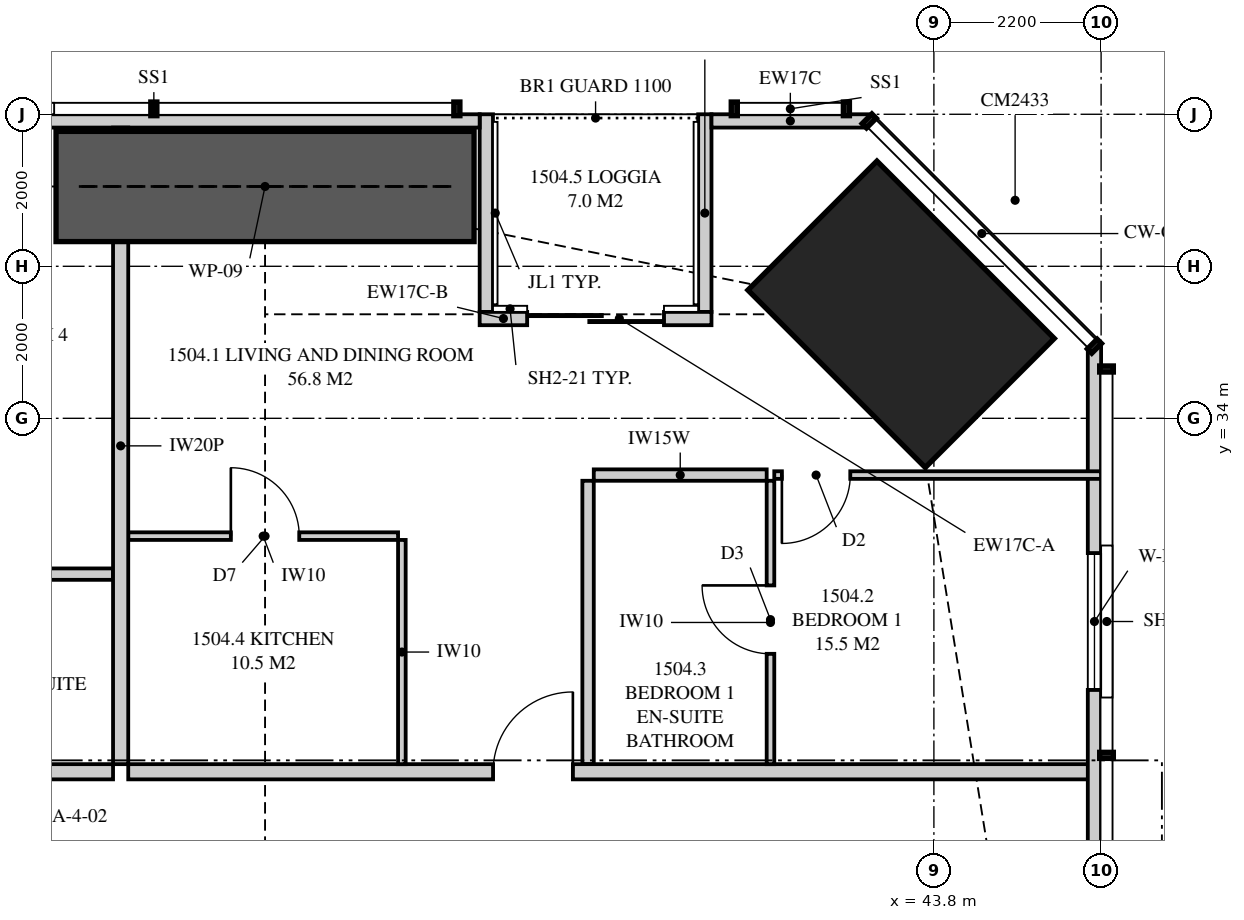
"""IFC4 building model, lengths in metres.
Left out: names, types, materials, properties, quantities, classifications, styles, units other than length and angle.
Written with IfcOpenShell. Run it as: python <this file> out.ifc"""

import sys

from ifc_helpers import new_model, si_unit, direction, frame, frame_2d, origin, origin_2d, place, context, subcontext, project, spatial, polyline, rectangle, outline, extrude, element, fill, save


model = new_model("IFC4")
c1 = context("Model", 3, precision=1e-05, world=origin(), true_north=direction((0.0, 1.0)))
c2 = subcontext(c1, "Body", "Model", "MODEL_VIEW")
j1 = project(units=[si_unit("LENGTHUNIT", "METRE"), si_unit("PLANEANGLEUNIT", "RADIAN")], contexts=[c1])
p1 = place(None, origin())
s1 = spatial("IfcSite", under=j1, at=p1, CompositionType="ELEMENT")
p2 = place(p1, origin())
s2 = spatial("IfcBuilding", under=s1, at=p2, CompositionType="ELEMENT")
p3 = place(p2, frame((0.0, 0.0, 57.85)))
s3 = spatial("IfcBuildingStorey", under=s2, at=p3, CompositionType="ELEMENT", Elevation=57.85)
p4 = place(p3, frame((43.369, 35.369, 0.0), z_axis=(0.0, 0.0, 1.0), x_axis=(-0.707106781187, -0.707106781187, 0.0)))
e1 = element("IfcColumn", 1, at=p4, inside=s3, PredefinedType="COLUMN", context=c2, shape_type="SweptSolid", body=[
    extrude(rectangle(XDim=2.4, YDim=3.3, at=origin_2d()), origin(), (0.0, 0.0, 1.0), 3.35),
])
p5 = place(p3, frame((45.913, 3.051, 0.0), z_axis=(0.0, 0.0, 1.0), x_axis=(0.0, 1.0, 0.0)))
e2 = element("IfcWall", 2, at=p5, inside=s3, PredefinedType="SOLIDWALL", context=c2, shape_type="SweptSolid", body=[
    extrude(outline(polyline([(0.0, 0.0), (31.897, 0.0), (31.897, 3.11), (22.167, 3.11), (22.167, 2.15), (22.074, 2.15), (22.074, 3.11), (21.949, 3.11), (21.949, 2.15), (9.949, 2.15), (9.949, 3.11), (9.823, 3.11), (9.823, 2.15), (9.73, 2.15), (9.73, 3.11), (0.0, 3.11), (0.0, 0.0)])), frame((0.0, 0.087, 0.0), z_axis=(0.0, -1.0, 0.0), x_axis=(1.0, 0.0, 0.0)), (0.0, 0.0, 1.0), 0.175),
])
p6 = place(p5, frame((2.222, 0.0, 0.4)))
e3 = element("IfcOpeningElement", 3, at=p6, cuts=e2, PredefinedType="OPENING", context=c2, shape_type="SweptSolid", body=[
    extrude(rectangle(XDim=1.8, YDim=1.7, at=frame_2d((0.9, 0.85))), frame((0.0, 0.097, 0.0), z_axis=(0.0, -1.0, 0.0), x_axis=(1.0, 0.0, 0.0)), (0.0, 0.0, 1.0), 0.195),
])
p7 = place(p5, frame((14.849, 0.0, 0.4)))
e4 = element("IfcOpeningElement", 4, at=p7, cuts=e2, PredefinedType="OPENING", context=c2, shape_type="SweptSolid", body=[
    extrude(rectangle(XDim=1.2, YDim=1.7, at=frame_2d((0.6, 0.85))), frame((0.0, 0.097, 0.0), z_axis=(0.0, -1.0, 0.0), x_axis=(1.0, 0.0, 0.0)), (0.0, 0.0, 1.0), 0.195),
])
p8 = place(p5, frame((27.375, 0.0, 0.4)))
e5 = element("IfcOpeningElement", 5, at=p8, cuts=e2, PredefinedType="OPENING", context=c2, shape_type="SweptSolid", body=[
    extrude(rectangle(XDim=1.8, YDim=1.7, at=frame_2d((0.9, 0.85))), frame((0.0, 0.097, 0.0), z_axis=(0.0, -1.0, 0.0), x_axis=(1.0, 0.0, 0.0)), (0.0, 0.0, 1.0), 0.195),
])
p9 = place(p3, frame((42.949, 37.913, 0.0), z_axis=(0.0, 0.0, 1.0), x_axis=(-1.0, 0.0, 0.0)))
e6 = element("IfcWall", 6, at=p9, inside=s3, PredefinedType="SOLIDWALL", context=c2, shape_type="SweptSolid", body=[
    extrude(rectangle(XDim=2.075, YDim=0.175, at=frame_2d((1.038, 0.0))), origin(), (0.0, 0.0, 1.0), 3.11),
])
p10 = place(p3, frame((37.824, 37.913, 0.0), z_axis=(0.0, 0.0, 1.0), x_axis=(-1.0, 0.0, 0.0)))
e7 = element("IfcWall", 7, at=p10, inside=s3, PredefinedType="SOLIDWALL", context=c2, shape_type="SweptSolid", body=[
    extrude(outline(polyline([(0.0, 0.0), (17.374, 0.0), (17.374, 2.15), (2.824, 2.15), (2.824, 3.11), (2.668, 3.11), (2.668, 2.15), (2.62, 2.15), (2.62, 3.11), (0.0, 3.11), (0.0, 0.0)])), frame((0.0, 0.087, 0.0), z_axis=(0.0, -1.0, 0.0), x_axis=(1.0, 0.0, 0.0)), (0.0, 0.0, 1.0), 0.175),
])
p11 = place(p10, frame((5.699, 0.0, 0.4)))
e8 = element("IfcOpeningElement", 8, at=p11, cuts=e7, PredefinedType="OPENING", context=c2, shape_type="SweptSolid", body=[
    extrude(rectangle(XDim=1.8, YDim=1.7, at=frame_2d((0.9, 0.85))), frame((0.0, 0.097, 0.0), z_axis=(0.0, -1.0, 0.0), x_axis=(1.0, 0.0, 0.0)), (0.0, 0.0, 1.0), 0.195),
])
p12 = place(p10, frame((9.124, 0.0, 0.4)))
e9 = element("IfcOpeningElement", 9, at=p12, cuts=e7, PredefinedType="OPENING", context=c2, shape_type="SweptSolid", body=[
    extrude(rectangle(XDim=1.8, YDim=1.7, at=frame_2d((0.9, 0.85))), frame((0.0, 0.097, 0.0), z_axis=(0.0, -1.0, 0.0), x_axis=(1.0, 0.0, 0.0)), (0.0, 0.0, 1.0), 0.195),
])
p13 = place(p3, frame((40.874, 35.312, 0.0), z_axis=(0.0, 0.0, 1.0), x_axis=(-1.0, 0.0, 0.0)))
e10 = element("IfcWall", 10, at=p13, inside=s3, PredefinedType="SOLIDWALL", context=c2, shape_type="SweptSolid", body=[
    extrude(rectangle(XDim=2.425, YDim=0.175, at=frame_2d((1.212, 0.0))), origin(), (0.0, 0.0, 1.0), 2.15),
])
p14 = place(p13, frame((0.625, 0.0, 0.0)))
e11 = element("IfcOpeningElement", 11, at=p14, cuts=e10, PredefinedType="OPENING", context=c2, shape_type="SweptSolid", body=[
    extrude(rectangle(XDim=1.8, YDim=2.1, at=frame_2d((0.9, 1.05))), frame((0.0, 0.097, 0.0), z_axis=(0.0, -1.0, 0.0), x_axis=(1.0, 0.0, 0.0)), (0.0, 0.0, 1.0), 0.195),
])
p15 = place(p3, frame((38.449, 35.312, 0.0), z_axis=(0.0, 0.0, 1.0), x_axis=(-1.0, 0.0, 0.0)))
e12 = element("IfcWall", 12, at=p15, inside=s3, PredefinedType="SOLIDWALL", context=c2, shape_type="SweptSolid", body=[
    extrude(rectangle(XDim=0.625, YDim=0.175, at=frame_2d((0.312, 0.0))), origin(), (0.0, 0.0, 1.0), 2.51),
])
p16 = place(p3, frame((40.786, 38.0, 0.0), z_axis=(0.0, 0.0, 1.0), x_axis=(0.0, -1.0, 0.0)))
e13 = element("IfcWall", 13, at=p16, inside=s3, PredefinedType="SOLIDWALL", context=c2, shape_type="SweptSolid", body=[
    extrude(outline(polyline([(0.0, 0.0), (2.6, 0.0), (2.6, 2.15), (1.279, 2.15), (1.279, 3.11), (0.0, 3.11), (0.0, 0.0)])), frame((0.0, 0.087, 0.0), z_axis=(0.0, -1.0, 0.0), x_axis=(1.0, 0.0, 0.0)), (0.0, 0.0, 1.0), 0.175),
])
p17 = place(p3, frame((37.911, 38.0, 0.0), z_axis=(0.0, 0.0, 1.0), x_axis=(0.0, -1.0, 0.0)))
e14 = element("IfcWall", 14, at=p17, inside=s3, PredefinedType="SOLIDWALL", context=c2, shape_type="SweptSolid", body=[
    extrude(outline(polyline([(0.0, 0.0), (2.6, 0.0), (2.6, 2.51), (2.368, 2.51), (2.368, 2.15), (0.701, 2.15), (0.701, 3.11), (0.0, 3.11), (0.0, 0.0)])), frame((0.0, 0.087, 0.0), z_axis=(0.0, -1.0, 0.0), x_axis=(1.0, 0.0, 0.0)), (0.0, 0.0, 1.0), 0.175),
])
p18 = place(p3, frame((33.1, 37.825, 0.0), z_axis=(0.0, 0.0, 1.0), x_axis=(0.0, -1.0, 0.0)))
e15 = element("IfcWall", 15, at=p18, inside=s3, PredefinedType="PARTITIONING", context=c2, shape_type="SweptSolid", body=[
    extrude(outline(polyline([(0.529, 2.15), (0.0, 2.15), (0.0, 0.0), (0.529, 0.0), (0.529, 0.205), (1.021, 0.205), (1.021, 0.0), (8.375, 0.0), (8.375, 3.11), (1.685, 3.11), (1.685, 2.15), (1.021, 2.15), (1.021, 1.945), (0.529, 1.945), (0.529, 2.15)])), frame((0.0, 0.1, 0.0), z_axis=(0.0, -1.0, 0.0), x_axis=(1.0, 0.0, 0.0)), (0.0, 0.0, 1.0), 0.2),
])
p19 = place(p3, frame((17.725, 29.35, 0.0), z_axis=(0.0, 0.0, 1.0), x_axis=(1.0, 0.0, 0.0)))
e16 = element("IfcWall", 16, at=p19, inside=s3, PredefinedType="PARTITIONING", context=c2, shape_type="SweptSolid", body=[
    extrude(outline(polyline([(0.0, 0.0), (15.275, 0.0), (15.275, 3.11), (6.612, 3.11), (6.612, 2.541), (5.938, 2.541), (5.938, 3.11), (0.0, 3.11), (0.0, 0.0)])), frame((0.0, 0.1, 0.0), z_axis=(0.0, -1.0, 0.0), x_axis=(1.0, 0.0, 0.0)), (0.0, 0.0, 1.0), 0.2),
])
p20 = place(p19, frame((0.2, 0.0, 0.0)))
e17 = element("IfcOpeningElement", 17, at=p20, cuts=e16, PredefinedType="OPENING", context=c2, shape_type="SweptSolid", body=[
    extrude(rectangle(XDim=1.05, YDim=2.2, at=frame_2d((0.525, 1.1))), frame((0.0, 0.11, 0.0), z_axis=(0.0, -1.0, 0.0), x_axis=(1.0, 0.0, 0.0)), (0.0, 0.0, 1.0), 0.22),
])
p21 = place(p3, frame((29.55, 31.95, 0.0), z_axis=(0.0, 0.0, 1.0), x_axis=(1.0, 0.0, 0.0)))
e18 = element("IfcWall", 18, at=p21, inside=s3, PredefinedType="PLUMBINGWALL", context=c2, shape_type="SweptSolid", body=[
    extrude(rectangle(XDim=3.45, YDim=0.15, at=frame_2d((1.725, 0.0))), origin(), (0.0, 0.0, 1.0), 3.11),
])
p22 = place(p21, frame((0.4, 0.0, 0.0)))
e19 = element("IfcOpeningElement", 19, at=p22, cuts=e18, PredefinedType="OPENING", context=c2, shape_type="SweptSolid", body=[
    extrude(rectangle(XDim=0.9, YDim=2.1, at=frame_2d((0.45, 1.05))), frame((0.0, 0.085, 0.0), z_axis=(0.0, -1.0, 0.0), x_axis=(1.0, 0.0, 0.0)), (0.0, 0.0, 1.0), 0.17),
])
p23 = place(p3, frame((33.2, 29.35, 0.0), z_axis=(0.0, 0.0, 1.0), x_axis=(1.0, 0.0, 0.0)))
e20 = element("IfcWall", 20, at=p23, inside=s3, PredefinedType="PARTITIONING", context=c2, shape_type="SweptSolid", body=[
    extrude(outline(polyline([(0.0, 0.0), (12.8, 0.0), (12.8, 3.11), (12.066, 3.11), (12.066, 2.15), (10.223, 2.15), (10.223, 3.11), (2.137, 3.11), (2.137, 2.541), (1.463, 2.541), (1.463, 3.11), (0.0, 3.11), (0.0, 0.0)])), frame((0.0, 0.1, 0.0), z_axis=(0.0, -1.0, 0.0), x_axis=(1.0, 0.0, 0.0)), (0.0, 0.0, 1.0), 0.2),
])
p24 = place(p23, frame((4.8, 0.0, 0.0)))
e21 = element("IfcOpeningElement", 21, at=p24, cuts=e20, PredefinedType="OPENING", context=c2, shape_type="SweptSolid", body=[
    extrude(rectangle(XDim=1.05, YDim=2.2, at=frame_2d((0.525, 1.1))), frame((0.0, 0.11, 0.0), z_axis=(0.0, -1.0, 0.0), x_axis=(1.0, 0.0, 0.0)), (0.0, 0.0, 1.0), 0.22),
])
p25 = place(p3, frame((41.65, 33.178, 0.0), z_axis=(0.0, 0.0, 1.0), x_axis=(0.0, -1.0, 0.0)))
e22 = element("IfcWall", 22, at=p25, inside=s3, PredefinedType="PARTITIONING", context=c2, shape_type="SweptSolid", body=[
    extrude(rectangle(XDim=3.728, YDim=0.1, at=frame_2d((1.864, 0.0))), origin(), (0.0, 0.0, 1.0), 3.11),
])
p26 = place(p25, frame((1.377, 0.0, 0.0)))
e23 = element("IfcOpeningElement", 23, at=p26, cuts=e22, PredefinedType="OPENING", context=c2, shape_type="SweptSolid", body=[
    extrude(rectangle(XDim=0.9, YDim=2.1, at=frame_2d((0.45, 1.05))), frame((0.0, 0.06, 0.0), z_axis=(0.0, -1.0, 0.0), x_axis=(1.0, 0.0, 0.0)), (0.0, 0.0, 1.0), 0.12),
])
p27 = place(p3, frame((41.7, 33.253, 0.0), z_axis=(0.0, 0.0, 1.0), x_axis=(1.0, 0.0, 0.0)))
e24 = element("IfcWall", 24, at=p27, inside=s3, PredefinedType="PARTITIONING", context=c2, shape_type="SweptSolid", body=[
    extrude(outline(polyline([(0.0, 0.0), (4.3, 0.0), (4.3, 3.11), (2.883, 3.11), (2.883, 2.15), (1.14, 2.15), (1.14, 3.11), (0.0, 3.11), (0.0, 0.0)])), frame((0.0, 0.05, 0.0), z_axis=(0.0, -1.0, 0.0), x_axis=(1.0, 0.0, 0.0)), (0.0, 0.0, 1.0), 0.1),
])
p28 = place(p27, frame((0.1, 0.0, 0.0)))
e25 = element("IfcOpeningElement", 25, at=p28, cuts=e24, PredefinedType="OPENING", context=c2, shape_type="SweptSolid", body=[
    extrude(rectangle(XDim=0.9, YDim=2.1, at=frame_2d((0.45, 1.05))), frame((0.0, 0.06, 0.0), z_axis=(0.0, -1.0, 0.0), x_axis=(1.0, 0.0, 0.0)), (0.0, 0.0, 1.0), 0.12),
])
p29 = place(p3, frame((39.325, 33.253, 0.0), z_axis=(0.0, 0.0, 1.0), x_axis=(1.0, 0.0, 0.0)))
e26 = element("IfcWall", 26, at=p29, inside=s3, PredefinedType="PLUMBINGWALL", context=c2, shape_type="SweptSolid", body=[
    extrude(rectangle(XDim=2.275, YDim=0.15, at=frame_2d((1.138, 0.0))), origin(), (0.0, 0.0, 1.0), 3.11),
])
p30 = place(p3, frame((39.25, 33.178, 0.0), z_axis=(0.0, 0.0, 1.0), x_axis=(0.0, -1.0, 0.0)))
e27 = element("IfcWall", 27, at=p30, inside=s3, PredefinedType="PLUMBINGWALL", context=c2, shape_type="SweptSolid", body=[
    extrude(rectangle(XDim=3.728, YDim=0.15, at=frame_2d((1.864, 0.0))), origin(), (0.0, 0.0, 1.0), 3.11),
])
p31 = place(p3, frame((33.2, 32.45, 0.0), z_axis=(0.0, 0.0, 1.0), x_axis=(1.0, 0.0, 0.0)))
e28 = element("IfcWall", 28, at=p31, inside=s3, PredefinedType="PARTITIONING", context=c2, shape_type="SweptSolid", body=[
    extrude(outline(polyline([(0.0, 0.0), (3.55, 0.0), (3.55, 3.11), (2.087, 3.11), (2.087, 2.541), (1.513, 2.541), (1.513, 3.11), (0.0, 3.11), (0.0, 0.0)])), frame((0.0, 0.05, 0.0), z_axis=(0.0, -1.0, 0.0), x_axis=(1.0, 0.0, 0.0)), (0.0, 0.0, 1.0), 0.1),
])
p32 = place(p31, frame((1.35, 0.0, 0.0)))
e29 = element("IfcOpeningElement", 29, at=p32, cuts=e28, PredefinedType="OPENING", context=c2, shape_type="SweptSolid", body=[
    extrude(rectangle(XDim=0.9, YDim=2.1, at=frame_2d((0.45, 1.05))), frame((0.0, 0.06, 0.0), z_axis=(0.0, -1.0, 0.0), x_axis=(1.0, 0.0, 0.0)), (0.0, 0.0, 1.0), 0.12),
])
p33 = place(p3, frame((36.8, 32.4, 0.0), z_axis=(0.0, 0.0, 1.0), x_axis=(0.0, -1.0, 0.0)))
e30 = element("IfcWall", 30, at=p33, inside=s3, PredefinedType="PARTITIONING", context=c2, shape_type="SweptSolid", body=[
    extrude(rectangle(XDim=2.95, YDim=0.1, at=frame_2d((1.475, 0.0))), origin(), (0.0, 0.0, 1.0), 3.11),
])
p34 = place(p3, frame((32.25, 37.05, 0.0), z_axis=(0.0, 0.0, 1.0), x_axis=(1.0, 0.0, 0.0)))
e31 = element("IfcWall", 31, at=p34, inside=s3, PredefinedType="SHEAR", context=c2, shape_type="SweptSolid", body=[
    extrude(rectangle(XDim=5.5, YDim=1.45, at=frame_2d((2.75, 0.0))), origin(), (0.0, 0.0, 1.0), 3.35),
])
p35 = place(p8, origin())
e32 = element("IfcWindow", 32, at=p35, inside=s3, PartitioningType="SINGLE_PANEL", PredefinedType="WINDOW", context=c2, shape_type="SweptSolid", body=[
    extrude(rectangle(XDim=1.8, YDim=1.7, at=frame_2d((0.9, 0.85))), frame((0.0, 0.03, 0.0), z_axis=(0.0, -1.0, 0.0), x_axis=(1.0, 0.0, 0.0)), (0.0, 0.0, 1.0), 0.06),
])
fill(e5, e32)
p36 = place(p14, origin())
e33 = element("IfcDoor", 33, at=p36, inside=s3, OperationType="SLIDING_TO_LEFT", PredefinedType="DOOR", context=c2, shape_type="SweptSolid", body=[
    extrude(rectangle(XDim=1.8, YDim=2.1, at=frame_2d((0.9, 1.05))), frame((0.0, 0.025, 0.0), z_axis=(0.0, -1.0, 0.0), x_axis=(1.0, 0.0, 0.0)), (0.0, 0.0, 1.0), 0.05),
])
fill(e11, e33)
p37 = place(p24, origin())
e34 = element("IfcDoor", 34, at=p37, inside=s3, OperationType="SINGLE_SWING_RIGHT", PredefinedType="DOOR", context=c2, shape_type="SweptSolid", body=[
    extrude(rectangle(XDim=1.05, YDim=2.2, at=frame_2d((0.525, 1.1))), frame((0.0, 0.025, 0.0), z_axis=(0.0, -1.0, 0.0), x_axis=(1.0, 0.0, 0.0)), (0.0, 0.0, 1.0), 0.05),
])
fill(e21, e34)
p38 = place(p28, frame((0.9, 0.0, 0.0), z_axis=(0.0, 0.0, 1.0), x_axis=(-1.0, 0.0, 0.0)))
e35 = element("IfcDoor", 35, at=p38, inside=s3, OperationType="SINGLE_SWING_RIGHT", PredefinedType="DOOR", context=c2, shape_type="SweptSolid", body=[
    extrude(rectangle(XDim=0.9, YDim=2.1, at=frame_2d((0.45, 1.05))), frame((0.0, 0.025, 0.0), z_axis=(0.0, -1.0, 0.0), x_axis=(1.0, 0.0, 0.0)), (0.0, 0.0, 1.0), 0.05),
])
fill(e25, e35)
p39 = place(p26, frame((0.9, 0.0, 0.0), z_axis=(0.0, 0.0, 1.0), x_axis=(-1.0, 0.0, 0.0)))
e36 = element("IfcDoor", 36, at=p39, inside=s3, OperationType="SINGLE_SWING_RIGHT", PredefinedType="DOOR", context=c2, shape_type="SweptSolid", body=[
    extrude(rectangle(XDim=0.9, YDim=2.1, at=frame_2d((0.45, 1.05))), frame((0.0, 0.025, 0.0), z_axis=(0.0, -1.0, 0.0), x_axis=(1.0, 0.0, 0.0)), (0.0, 0.0, 1.0), 0.05),
])
fill(e23, e36)
p40 = place(p32, origin())
e37 = element("IfcDoor", 37, at=p40, inside=s3, OperationType="SINGLE_SWING_LEFT", PredefinedType="DOOR", context=c2, shape_type="SweptSolid", body=[
    extrude(rectangle(XDim=0.9, YDim=2.1, at=frame_2d((0.45, 1.05))), frame((0.0, 0.025, 0.0), z_axis=(0.0, -1.0, 0.0), x_axis=(1.0, 0.0, 0.0)), (0.0, 0.0, 1.0), 0.05),
])
fill(e29, e37)
save(model, sys.argv[1])
